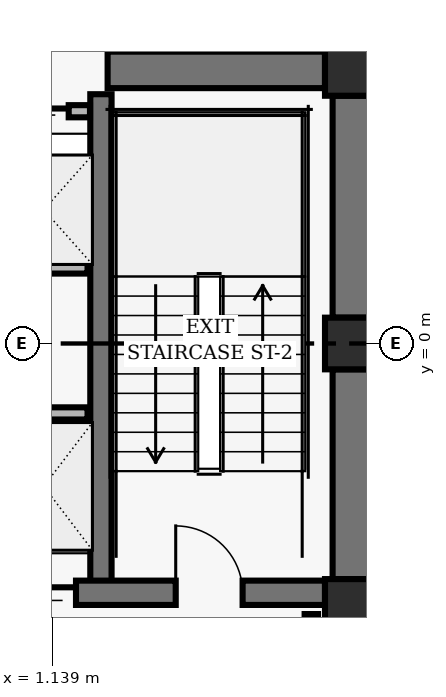
"""IFC4 building model, lengths in metres.
Left out: names, types, materials, properties, quantities, classifications, styles, units other than length and angle.
Written with IfcOpenShell. Run it as: python <this file> out.ifc"""

import sys

from ifc_helpers import new_model, si_unit, direction, frame, frame_2d, origin, origin_2d, place, context, subcontext, project, spatial, rectangle, hollow_rectangle, extrude, element, fill, save


model = new_model("IFC4")
c1 = context("Model", 3, precision=1e-05, world=origin(), true_north=direction((0.0, 1.0)))
c2 = subcontext(c1, "Body", "Model", "MODEL_VIEW")
j1 = project(units=[si_unit("LENGTHUNIT", "METRE"), si_unit("PLANEANGLEUNIT", "RADIAN")], contexts=[c1])
p1 = place(None, origin())
s1 = spatial("IfcSite", under=j1, at=p1, CompositionType="ELEMENT")
p2 = place(p1, origin())
s2 = spatial("IfcBuilding", under=s1, at=p2, CompositionType="ELEMENT")
p3 = place(p2, frame((0.0, 0.0, 171.52)))
s3 = spatial("IfcBuildingStorey", under=s2, at=p3, CompositionType="ELEMENT", Elevation=171.52)
for number, where, z_axis, x_axis in (
    (1, (6.05, 4.5, 0.0), (0.0, 0.0, 1.0), (1.0, 0.0, 0.0)),
    (2, (6.05, 0.0, 0.0), (0.0, 0.0, 1.0), (1.0, 0.0, 0.0)),
    (3, (6.05, -4.3, 0.0), (0.0, 0.0, 1.0), (1.0, 0.0, 0.0)),
):
    element("IfcColumn", number, at=place(p3, frame(where, z_axis=z_axis, x_axis=x_axis)), inside=s3, PredefinedType="COLUMN", context=c2, shape_type="SweptSolid", body=[
        extrude(hollow_rectangle(XDim=0.85, YDim=0.85, WallThickness=0.055, InnerFilletRadius=0.02, OuterFilletRadius=0.04, at=origin_2d()), origin(), (0.0, 0.0, 1.0), 3.84),
    ])
p4 = place(p3, frame((6.05, 0.425, 0.0), z_axis=(0.0, 0.0, 1.0), x_axis=(0.0, 1.0, 0.0)))
e4 = element("IfcWall", 4, at=p4, inside=s3, PredefinedType="SHEAR", context=c2, shape_type="SweptSolid", body=[
    extrude(rectangle(XDim=3.65, YDim=0.6, at=frame_2d((1.825, 0.0))), origin(), (0.0, 0.0, 1.0), 3.418),
])
p5 = place(p3, frame((6.05, -3.875, 0.0), z_axis=(0.0, 0.0, 1.0), x_axis=(0.0, 1.0, 0.0)))
e5 = element("IfcWall", 5, at=p5, inside=s3, PredefinedType="SHEAR", context=c2, shape_type="SweptSolid", body=[
    extrude(rectangle(XDim=3.45, YDim=0.6, at=frame_2d((1.725, 0.0))), origin(), (0.0, 0.0, 1.0), 3.418),
])
p6 = place(p3, frame((1.94, -4.1, 0.0), z_axis=(0.0, 0.0, 1.0), x_axis=(0.0, 1.0, 0.0)))
e6 = element("IfcWall", 6, at=p6, inside=s3, PredefinedType="SHEAR", context=c2, shape_type="SweptSolid", body=[
    extrude(rectangle(XDim=8.2, YDim=0.35, at=frame_2d((4.1, 0.0))), origin(), (0.0, 0.0, 1.0), 3.418),
])
p7 = place(p3, frame((-5.625, -4.1, 0.0), z_axis=(0.0, 0.0, 1.0), x_axis=(1.0, 0.0, 0.0)))
e7 = element("IfcWall", 7, at=p7, inside=s3, PredefinedType="SHEAR", context=c2, shape_type="SweptSolid", body=[
    extrude(rectangle(XDim=11.25, YDim=0.4, at=frame_2d((5.625, 0.0))), origin(), (0.0, 0.0, 1.0), 3.418),
])
p8 = place(p7, frame((1.355, 0.0, 0.0)))
e8 = element("IfcOpeningElement", 8, at=p8, cuts=e7, PredefinedType="OPENING", context=c2, shape_type="SweptSolid", body=[
    extrude(rectangle(XDim=1.1, YDim=2.04, at=frame_2d((0.55, 1.02))), frame((0.0, 0.21, 0.0), z_axis=(0.0, -1.0, 0.0), x_axis=(1.0, 0.0, 0.0)), (0.0, 0.0, 1.0), 0.42),
])
p9 = place(p7, frame((8.795, 0.0, 0.0)))
e9 = element("IfcOpeningElement", 9, at=p9, cuts=e7, PredefinedType="OPENING", context=c2, shape_type="SweptSolid", body=[
    extrude(rectangle(XDim=1.1, YDim=2.04, at=frame_2d((0.55, 1.02))), frame((0.0, 0.21, 0.0), z_axis=(0.0, -1.0, 0.0), x_axis=(1.0, 0.0, 0.0)), (0.0, 0.0, 1.0), 0.42),
])
p10 = place(p7, frame((4.095, 0.0, 0.0)))
e10 = element("IfcOpeningElement", 10, at=p10, cuts=e7, PredefinedType="OPENING", context=c2, shape_type="SweptSolid", body=[
    extrude(rectangle(XDim=1.06, YDim=2.04, at=frame_2d((0.53, 1.02))), frame((0.0, 0.21, 0.0), z_axis=(0.0, -1.0, 0.0), x_axis=(1.0, 0.0, 0.0)), (0.0, 0.0, 1.0), 0.42),
])
p11 = place(p7, frame((6.095, 0.0, 0.0)))
e11 = element("IfcOpeningElement", 11, at=p11, cuts=e7, PredefinedType="OPENING", context=c2, shape_type="SweptSolid", body=[
    extrude(rectangle(XDim=1.06, YDim=2.04, at=frame_2d((0.53, 1.02))), frame((0.0, 0.21, 0.0), z_axis=(0.0, -1.0, 0.0), x_axis=(1.0, 0.0, 0.0)), (0.0, 0.0, 1.0), 0.42),
])
p12 = place(p3, frame((2.05, 4.5, 0.0), z_axis=(0.0, 0.0, 1.0), x_axis=(1.0, 0.0, 0.0)))
e12 = element("IfcWall", 12, at=p12, inside=s3, PredefinedType="SHEAR", context=c2, shape_type="SweptSolid", body=[
    extrude(rectangle(XDim=3.575, YDim=0.6, at=frame_2d((1.788, 0.0))), origin(), (0.0, 0.0, 1.0), 3.418),
])
p13 = place(p3, frame((-1.72, -1.15, 0.0), z_axis=(0.0, 0.0, 1.0), x_axis=(1.0, 0.0, 0.0)))
e13 = element("IfcWall", 13, at=p13, inside=s3, PredefinedType="PARTITIONING", context=c2, shape_type="SweptSolid", body=[
    extrude(rectangle(XDim=3.44, YDim=0.2, at=frame_2d((1.72, 0.0))), origin(), (0.0, 0.0, 1.0), 3.393),
])
p14 = place(p3, frame((5.4, -7.16, 0.0), z_axis=(0.0, 0.0, 1.0), x_axis=(0.0, 1.0, 0.0)))
e14 = element("IfcWall", 14, at=p14, inside=s3, PredefinedType="PARTITIONING", context=c2, shape_type="SweptSolid", body=[
    extrude(rectangle(XDim=2.71, YDim=0.22, at=frame_2d((1.355, 0.0))), origin(), (0.0, 0.0, 1.0), 3.393),
])
p15 = place(p3, frame((-1.72, 1.25, 0.0), z_axis=(0.0, 0.0, 1.0), x_axis=(1.0, 0.0, 0.0)))
e15 = element("IfcWall", 15, at=p15, inside=s3, PredefinedType="PARTITIONING", context=c2, shape_type="SweptSolid", body=[
    extrude(rectangle(XDim=3.44, YDim=0.2, at=frame_2d((1.72, 0.0))), origin(), (0.0, 0.0, 1.0), 3.393),
])
p16 = place(p3, frame((-1.76, 3.82, 0.0), z_axis=(0.0, 0.0, 1.0), x_axis=(1.0, 0.0, 0.0)))
e16 = element("IfcWall", 16, at=p16, inside=s3, PredefinedType="PARTITIONING", context=c2, shape_type="SweptSolid", body=[
    extrude(rectangle(XDim=3.52, YDim=0.2, at=frame_2d((1.76, 0.0))), origin(), (0.0, 0.0, 1.0), 3.393),
])
p17 = place(p16, frame((0.35, 0.0, 0.0)))
e17 = element("IfcOpeningElement", 17, at=p17, cuts=e16, PredefinedType="OPENING", context=c2, shape_type="SweptSolid", body=[
    extrude(rectangle(XDim=1.06, YDim=2.04, at=frame_2d((0.53, 1.02))), frame((0.0, 0.11, 0.0), z_axis=(0.0, -1.0, 0.0), x_axis=(1.0, 0.0, 0.0)), (0.0, 0.0, 1.0), 0.22),
])
p18 = place(p16, frame((2.11, 0.0, 0.0)))
e18 = element("IfcOpeningElement", 18, at=p18, cuts=e16, PredefinedType="OPENING", context=c2, shape_type="SweptSolid", body=[
    extrude(rectangle(XDim=1.06, YDim=2.04, at=frame_2d((0.53, 1.02))), frame((0.0, 0.11, 0.0), z_axis=(0.0, -1.0, 0.0), x_axis=(1.0, 0.0, 0.0)), (0.0, 0.0, 1.0), 0.22),
])
p19 = place(p9, origin())
e19 = element("IfcDoor", 19, at=p19, inside=s3, OperationType="SINGLE_SWING_LEFT", PredefinedType="DOOR", context=c2, shape_type="SweptSolid", body=[
    extrude(rectangle(XDim=1.1, YDim=2.04, at=frame_2d((0.55, 1.02))), frame((0.0, 0.025, 0.0), z_axis=(0.0, -1.0, 0.0), x_axis=(1.0, 0.0, 0.0)), (0.0, 0.0, 1.0), 0.05),
])
fill(e9, e19)
p20 = place(p11, origin())
e20 = element("IfcDoor", 20, at=p20, inside=s3, OperationType="SLIDING_TO_RIGHT", PredefinedType="DOOR", context=c2, shape_type="SweptSolid", body=[
    extrude(rectangle(XDim=1.06, YDim=2.04, at=frame_2d((0.53, 1.02))), frame((0.0, 0.025, 0.0), z_axis=(0.0, -1.0, 0.0), x_axis=(1.0, 0.0, 0.0)), (0.0, 0.0, 1.0), 0.05),
])
fill(e11, e20)
p21 = place(p18, origin())
e21 = element("IfcDoor", 21, at=p21, inside=s3, OperationType="SLIDING_TO_RIGHT", PredefinedType="DOOR", context=c2, shape_type="SweptSolid", body=[
    extrude(rectangle(XDim=1.06, YDim=2.04, at=frame_2d((0.53, 1.02))), frame((0.0, 0.025, 0.0), z_axis=(0.0, -1.0, 0.0), x_axis=(1.0, 0.0, 0.0)), (0.0, 0.0, 1.0), 0.05),
])
fill(e18, e21)
save(model, sys.argv[1])
